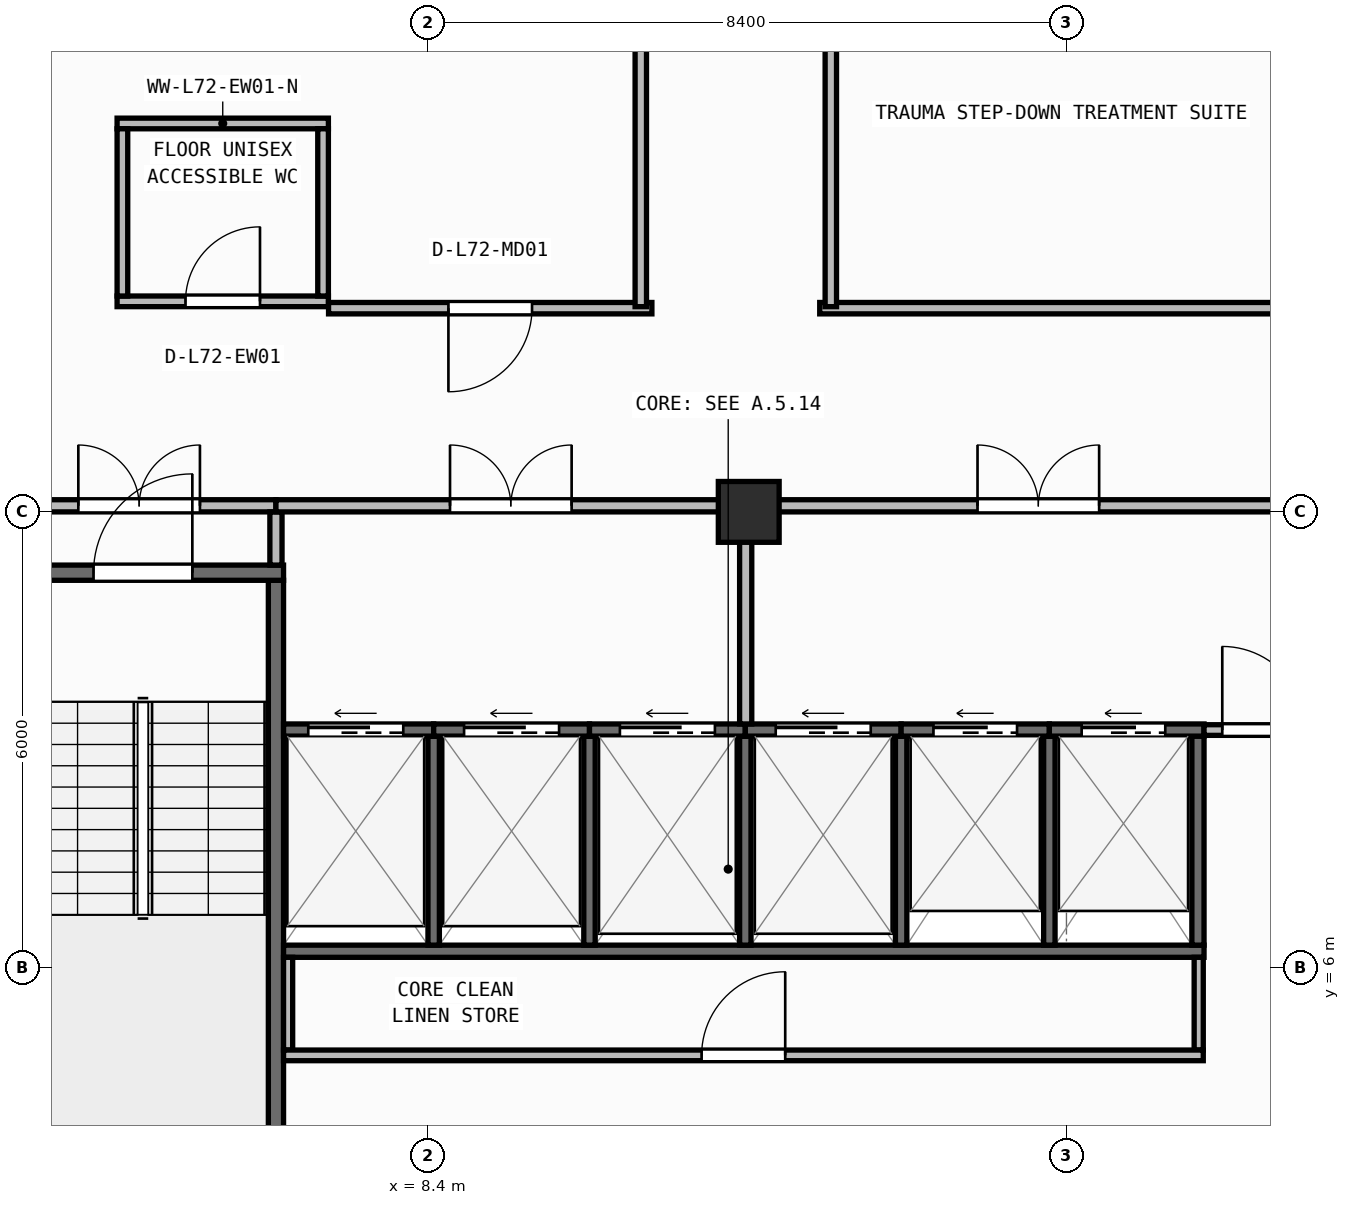
"""IFC4 building model, lengths in metres.
Left out: names, types, materials, properties, quantities, classifications, styles, units other than length and angle.
Written with IfcOpenShell. Run it as: python <this file> out.ifc"""

import sys

from ifc_helpers import new_model, si_unit, direction, frame, frame_2d, origin, origin_2d, place, context, subcontext, project, spatial, rectangle, extrude, element, fill, save


model = new_model("IFC4")
c1 = context("Model", 3, precision=1e-05, world=origin(), true_north=direction((0.0, 1.0)))
c2 = subcontext(c1, "Body", "Model", "MODEL_VIEW")
j1 = project(units=[si_unit("LENGTHUNIT", "METRE"), si_unit("PLANEANGLEUNIT", "RADIAN")], contexts=[c1])
p1 = place(None, origin())
s1 = spatial("IfcSite", under=j1, at=p1, CompositionType="ELEMENT")
p2 = place(p1, origin())
s2 = spatial("IfcBuilding", under=s1, at=p2, CompositionType="ELEMENT")
p3 = place(p2, frame((0.0, 0.0, 292.1)))
s3 = spatial("IfcBuildingStorey", under=s2, at=p3, CompositionType="ELEMENT", Elevation=292.1)
p4 = place(p3, frame((12.62, 12.0, 0.0), z_axis=(0.0, 0.0, 1.0), x_axis=(1.0, 0.0, 0.0)))
e1 = element("IfcColumn", 1, at=p4, inside=s3, PredefinedType="COLUMN", context=c2, shape_type="SweptSolid", body=[
    extrude(rectangle(XDim=0.8, YDim=0.8, at=origin_2d()), origin(), (0.0, 0.0, 1.0), 3.95),
])
p5 = place(p3, frame((6.4, 3.5, 0.0), z_axis=(0.0, 0.0, 1.0), x_axis=(0.0, 1.0, 0.0)))
e2 = element("IfcWall", 2, at=p5, inside=s3, PredefinedType="SHEAR", context=c2, shape_type="SweptSolid", body=[
    extrude(rectangle(XDim=7.6, YDim=0.2, at=frame_2d((3.8, 0.0))), origin(), (0.0, 0.0, 1.0), 3.71),
])
p6 = place(p3, frame((2.8, 11.2, 0.0), z_axis=(0.0, 0.0, 1.0), x_axis=(1.0, 0.0, 0.0)))
e3 = element("IfcWall", 3, at=p6, inside=s3, PredefinedType="SHEAR", context=c2, shape_type="SweptSolid", body=[
    extrude(rectangle(XDim=3.7, YDim=0.2, at=frame_2d((1.85, 0.0))), origin(), (0.0, 0.0, 1.0), 3.71),
])
p7 = place(p6, frame((1.2, 0.0, 0.0)))
e4 = element("IfcOpeningElement", 4, at=p7, cuts=e3, PredefinedType="OPENING", context=c2, shape_type="SweptSolid", body=[
    extrude(rectangle(XDim=1.3, YDim=2.15, at=frame_2d((0.65, 1.075))), frame((0.0, 0.11, 0.0), z_axis=(0.0, -1.0, 0.0), x_axis=(1.0, 0.0, 0.0)), (0.0, 0.0, 1.0), 0.22),
])
p8 = place(p3, frame((6.5, 6.22, 0.0), z_axis=(0.0, 0.0, 1.0), x_axis=(1.0, 0.0, 0.0)))
e5 = element("IfcWall", 5, at=p8, inside=s3, PredefinedType="SHEAR", context=c2, shape_type="SweptSolid", body=[
    extrude(rectangle(XDim=12.11, YDim=0.16, at=frame_2d((6.055, 0.0))), origin(), (0.0, 0.0, 1.0), 3.71),
])
p9 = place(p3, frame((18.53, 6.3, 0.0), z_axis=(0.0, 0.0, 1.0), x_axis=(0.0, 1.0, 0.0)))
e6 = element("IfcWall", 6, at=p9, inside=s3, PredefinedType="SHEAR", context=c2, shape_type="SweptSolid", body=[
    extrude(rectangle(XDim=2.75, YDim=0.16, at=frame_2d((1.375, 0.0))), origin(), (0.0, 0.0, 1.0), 3.71),
])
for number, where, z_axis, x_axis in (
    (7, (8.475, 6.3, 0.0), (0.0, 0.0, 1.0), (0.0, 1.0, 0.0)),
    (8, (10.525, 6.3, 0.0), (0.0, 0.0, 1.0), (0.0, 1.0, 0.0)),
    (9, (12.575, 6.3, 0.0), (0.0, 0.0, 1.0), (0.0, 1.0, 0.0)),
    (10, (14.625, 6.3, 0.0), (0.0, 0.0, 1.0), (0.0, 1.0, 0.0)),
    (11, (16.575, 6.3, 0.0), (0.0, 0.0, 1.0), (0.0, 1.0, 0.0)),
):
    element("IfcWall", number, at=place(p3, frame(where, z_axis=z_axis, x_axis=x_axis)), inside=s3, PredefinedType="SHEAR", context=c2, shape_type="SweptSolid", body=[
        extrude(rectangle(XDim=2.75, YDim=0.15, at=frame_2d((1.375, 0.0))), origin(), (0.0, 0.0, 1.0), 3.71),
    ])
p10 = place(p3, frame((6.5, 9.13, 0.0), z_axis=(0.0, 0.0, 1.0), x_axis=(1.0, 0.0, 0.0)))
e12 = element("IfcWall", 12, at=p10, inside=s3, PredefinedType="SHEAR", context=c2, shape_type="SweptSolid", body=[
    extrude(rectangle(XDim=1.975, YDim=0.16, at=frame_2d((0.988, 0.0))), origin(), (0.0, 0.0, 1.0), 3.71),
])
p11 = place(p10, frame((0.325, 0.0, 0.0)))
e13 = element("IfcOpeningElement", 13, at=p11, cuts=e12, PredefinedType="OPENING", context=c2, shape_type="SweptSolid", body=[
    extrude(rectangle(XDim=1.25, YDim=2.15, at=frame_2d((0.625, 1.075))), frame((0.0, 0.09, 0.0), z_axis=(0.0, -1.0, 0.0), x_axis=(1.0, 0.0, 0.0)), (0.0, 0.0, 1.0), 0.18),
])
p12 = place(p3, frame((8.475, 9.13, 0.0), z_axis=(0.0, 0.0, 1.0), x_axis=(1.0, 0.0, 0.0)))
e14 = element("IfcWall", 14, at=p12, inside=s3, PredefinedType="SHEAR", context=c2, shape_type="SweptSolid", body=[
    extrude(rectangle(XDim=2.05, YDim=0.16, at=frame_2d((1.025, 0.0))), origin(), (0.0, 0.0, 1.0), 3.71),
])
p13 = place(p12, frame((0.4, 0.0, 0.0)))
e15 = element("IfcOpeningElement", 15, at=p13, cuts=e14, PredefinedType="OPENING", context=c2, shape_type="SweptSolid", body=[
    extrude(rectangle(XDim=1.25, YDim=2.15, at=frame_2d((0.625, 1.075))), frame((0.0, 0.09, 0.0), z_axis=(0.0, -1.0, 0.0), x_axis=(1.0, 0.0, 0.0)), (0.0, 0.0, 1.0), 0.18),
])
p14 = place(p3, frame((10.525, 9.13, 0.0), z_axis=(0.0, 0.0, 1.0), x_axis=(1.0, 0.0, 0.0)))
e16 = element("IfcWall", 16, at=p14, inside=s3, PredefinedType="SHEAR", context=c2, shape_type="SweptSolid", body=[
    extrude(rectangle(XDim=2.05, YDim=0.16, at=frame_2d((1.025, 0.0))), origin(), (0.0, 0.0, 1.0), 3.71),
])
p15 = place(p14, frame((0.4, 0.0, 0.0)))
e17 = element("IfcOpeningElement", 17, at=p15, cuts=e16, PredefinedType="OPENING", context=c2, shape_type="SweptSolid", body=[
    extrude(rectangle(XDim=1.25, YDim=2.15, at=frame_2d((0.625, 1.075))), frame((0.0, 0.09, 0.0), z_axis=(0.0, -1.0, 0.0), x_axis=(1.0, 0.0, 0.0)), (0.0, 0.0, 1.0), 0.18),
])
p16 = place(p3, frame((12.575, 9.13, 0.0), z_axis=(0.0, 0.0, 1.0), x_axis=(1.0, 0.0, 0.0)))
e18 = element("IfcWall", 18, at=p16, inside=s3, PredefinedType="SHEAR", context=c2, shape_type="SweptSolid", body=[
    extrude(rectangle(XDim=2.05, YDim=0.16, at=frame_2d((1.025, 0.0))), origin(), (0.0, 0.0, 1.0), 3.71),
])
p17 = place(p16, frame((0.4, 0.0, 0.0)))
e19 = element("IfcOpeningElement", 19, at=p17, cuts=e18, PredefinedType="OPENING", context=c2, shape_type="SweptSolid", body=[
    extrude(rectangle(XDim=1.25, YDim=2.15, at=frame_2d((0.625, 1.075))), frame((0.0, 0.09, 0.0), z_axis=(0.0, -1.0, 0.0), x_axis=(1.0, 0.0, 0.0)), (0.0, 0.0, 1.0), 0.18),
])
p18 = place(p3, frame((14.625, 9.13, 0.0), z_axis=(0.0, 0.0, 1.0), x_axis=(1.0, 0.0, 0.0)))
e20 = element("IfcWall", 20, at=p18, inside=s3, PredefinedType="SHEAR", context=c2, shape_type="SweptSolid", body=[
    extrude(rectangle(XDim=1.95, YDim=0.16, at=frame_2d((0.975, 0.0))), origin(), (0.0, 0.0, 1.0), 3.71),
])
p19 = place(p18, frame((0.425, 0.0, 0.0)))
e21 = element("IfcOpeningElement", 21, at=p19, cuts=e20, PredefinedType="OPENING", context=c2, shape_type="SweptSolid", body=[
    extrude(rectangle(XDim=1.1, YDim=2.15, at=frame_2d((0.55, 1.075))), frame((0.0, 0.09, 0.0), z_axis=(0.0, -1.0, 0.0), x_axis=(1.0, 0.0, 0.0)), (0.0, 0.0, 1.0), 0.18),
])
p20 = place(p3, frame((16.575, 9.13, 0.0), z_axis=(0.0, 0.0, 1.0), x_axis=(1.0, 0.0, 0.0)))
e22 = element("IfcWall", 22, at=p20, inside=s3, PredefinedType="SHEAR", context=c2, shape_type="SweptSolid", body=[
    extrude(rectangle(XDim=2.035, YDim=0.16, at=frame_2d((1.018, 0.0))), origin(), (0.0, 0.0, 1.0), 3.71),
])
p21 = place(p20, frame((0.425, 0.0, 0.0)))
e23 = element("IfcOpeningElement", 23, at=p21, cuts=e22, PredefinedType="OPENING", context=c2, shape_type="SweptSolid", body=[
    extrude(rectangle(XDim=1.1, YDim=2.15, at=frame_2d((0.55, 1.075))), frame((0.0, 0.09, 0.0), z_axis=(0.0, -1.0, 0.0), x_axis=(1.0, 0.0, 0.0)), (0.0, 0.0, 1.0), 0.18),
])
for number, where, z_axis, x_axis in (
    (24, (6.56, 4.92, 0.0), (0.0, 0.0, 1.0), (0.0, 1.0, 0.0)),
    (25, (18.54, 4.92, 0.0), (0.0, 0.0, 1.0), (0.0, 1.0, 0.0)),
):
    element("IfcWall", number, at=place(p3, frame(where, z_axis=z_axis, x_axis=x_axis)), inside=s3, PredefinedType="PARTITIONING", context=c2, shape_type="SweptSolid", body=[
        extrude(rectangle(XDim=1.22, YDim=0.12, at=frame_2d((0.61, 0.0))), origin(), (0.0, 0.0, 1.0), 3.71),
    ])
p22 = place(p3, frame((6.5, 4.85, 0.0), z_axis=(0.0, 0.0, 1.0), x_axis=(1.0, 0.0, 0.0)))
e26 = element("IfcWall", 26, at=p22, inside=s3, PredefinedType="PARTITIONING", context=c2, shape_type="SweptSolid", body=[
    extrude(rectangle(XDim=12.1, YDim=0.14, at=frame_2d((6.05, 0.0))), origin(), (0.0, 0.0, 1.0), 3.71),
])
p23 = place(p22, frame((5.5, 0.0, 0.0)))
e27 = element("IfcOpeningElement", 27, at=p23, cuts=e26, PredefinedType="OPENING", context=c2, shape_type="SweptSolid", body=[
    extrude(rectangle(XDim=1.1, YDim=2.1, at=frame_2d((0.55, 1.05))), frame((0.0, 0.08, 0.0), z_axis=(0.0, -1.0, 0.0), x_axis=(1.0, 0.0, 0.0)), (0.0, 0.0, 1.0), 0.16),
])
p24 = place(p3, frame((18.61, 9.13, 0.0), z_axis=(0.0, 0.0, 1.0), x_axis=(1.0, 0.0, 0.0)))
e28 = element("IfcWall", 28, at=p24, inside=s3, PredefinedType="PARTITIONING", context=c2, shape_type="SweptSolid", body=[
    extrude(rectangle(XDim=1.59, YDim=0.14, at=frame_2d((0.795, 0.0))), origin(), (0.0, 0.0, 1.0), 3.71),
])
p25 = place(p24, frame((0.24, 0.0, 0.0)))
e29 = element("IfcOpeningElement", 29, at=p25, cuts=e28, PredefinedType="OPENING", context=c2, shape_type="SweptSolid", body=[
    extrude(rectangle(XDim=1.1, YDim=2.1, at=frame_2d((0.55, 1.05))), frame((0.0, 0.08, 0.0), z_axis=(0.0, -1.0, 0.0), x_axis=(1.0, 0.0, 0.0)), (0.0, 0.0, 1.0), 0.16),
])
p26 = place(p3, frame((2.8, 12.08, 0.0), z_axis=(0.0, 0.0, 1.0), x_axis=(1.0, 0.0, 0.0)))
e30 = element("IfcWall", 30, at=p26, inside=s3, PredefinedType="PARTITIONING", context=c2, shape_type="SweptSolid", body=[
    extrude(rectangle(XDim=3.6, YDim=0.16, at=frame_2d((1.8, 0.0))), origin(), (0.0, 0.0, 1.0), 3.157),
])
p27 = place(p26, frame((1.0, 0.0, 0.0)))
e31 = element("IfcOpeningElement", 31, at=p27, cuts=e30, PredefinedType="OPENING", context=c2, shape_type="SweptSolid", body=[
    extrude(rectangle(XDim=1.6, YDim=2.05, at=frame_2d((0.8, 1.025))), frame((0.0, 0.09, 0.0), z_axis=(0.0, -1.0, 0.0), x_axis=(1.0, 0.0, 0.0)), (0.0, 0.0, 1.0), 0.18),
])
p28 = place(p3, frame((6.4, 11.3, 0.0), z_axis=(0.0, 0.0, 1.0), x_axis=(0.0, 1.0, 0.0)))
e32 = element("IfcWall", 32, at=p28, inside=s3, PredefinedType="PARTITIONING", context=c2, shape_type="SweptSolid", body=[
    extrude(rectangle(XDim=0.7, YDim=0.16, at=frame_2d((0.35, 0.0))), origin(), (0.0, 0.0, 1.0), 3.71),
])
p29 = place(p3, frame((6.4, 12.08, 0.0), z_axis=(0.0, 0.0, 1.0), x_axis=(1.0, 0.0, 0.0)))
e33 = element("IfcWall", 33, at=p29, inside=s3, PredefinedType="PARTITIONING", context=c2, shape_type="SweptSolid", body=[
    extrude(rectangle(XDim=6.18, YDim=0.16, at=frame_2d((3.09, 0.0))), origin(), (0.0, 0.0, 1.0), 3.157),
])
p30 = place(p29, frame((2.29, 0.0, 0.0)))
e34 = element("IfcOpeningElement", 34, at=p30, cuts=e33, PredefinedType="OPENING", context=c2, shape_type="SweptSolid", body=[
    extrude(rectangle(XDim=1.6, YDim=2.05, at=frame_2d((0.8, 1.025))), frame((0.0, 0.09, 0.0), z_axis=(0.0, -1.0, 0.0), x_axis=(1.0, 0.0, 0.0)), (0.0, 0.0, 1.0), 0.18),
])
p31 = place(p3, frame((12.58, 9.21, 0.0), z_axis=(0.0, 0.0, 1.0), x_axis=(0.0, 1.0, 0.0)))
e35 = element("IfcWall", 35, at=p31, inside=s3, PredefinedType="PARTITIONING", context=c2, shape_type="SweptSolid", body=[
    extrude(rectangle(XDim=2.79, YDim=0.16, at=frame_2d((1.395, 0.0))), origin(), (0.0, 0.0, 1.0), 3.71),
])
p32 = place(p3, frame((12.58, 12.08, 0.0), z_axis=(0.0, 0.0, 1.0), x_axis=(1.0, 0.0, 0.0)))
e36 = element("IfcWall", 36, at=p32, inside=s3, PredefinedType="PARTITIONING", context=c2, shape_type="SweptSolid", body=[
    extrude(rectangle(XDim=7.7, YDim=0.16, at=frame_2d((3.85, 0.0))), origin(), (0.0, 0.0, 1.0), 3.157),
])
p33 = place(p32, frame((3.05, 0.0, 0.0)))
e37 = element("IfcOpeningElement", 37, at=p33, cuts=e36, PredefinedType="OPENING", context=c2, shape_type="SweptSolid", body=[
    extrude(rectangle(XDim=1.6, YDim=2.05, at=frame_2d((0.8, 1.025))), frame((0.0, 0.09, 0.0), z_axis=(0.0, -1.0, 0.0), x_axis=(1.0, 0.0, 0.0)), (0.0, 0.0, 1.0), 0.18),
])
p34 = place(p3, frame((4.31, 14.77, 0.0), z_axis=(0.0, 0.0, 1.0), x_axis=(1.0, 0.0, 0.0)))
e38 = element("IfcWall", 38, at=p34, inside=s3, PredefinedType="PARTITIONING", context=c2, shape_type="SweptSolid", body=[
    extrude(rectangle(XDim=2.78, YDim=0.14, at=frame_2d((1.39, 0.0))), origin(), (0.0, 0.0, 1.0), 3.71),
])
p35 = place(p34, frame((0.9, 0.0, 0.0)))
e39 = element("IfcOpeningElement", 39, at=p35, cuts=e38, PredefinedType="OPENING", context=c2, shape_type="SweptSolid", body=[
    extrude(rectangle(XDim=0.98, YDim=2.1, at=frame_2d((0.49, 1.05))), frame((0.0, 0.08, 0.0), z_axis=(0.0, -1.0, 0.0), x_axis=(1.0, 0.0, 0.0)), (0.0, 0.0, 1.0), 0.16),
])
p36 = place(p3, frame((4.31, 17.11, 0.0), z_axis=(0.0, 0.0, 1.0), x_axis=(1.0, 0.0, 0.0)))
e40 = element("IfcWall", 40, at=p36, inside=s3, PredefinedType="PARTITIONING", context=c2, shape_type="SweptSolid", body=[
    extrude(rectangle(XDim=2.78, YDim=0.14, at=frame_2d((1.39, 0.0))), origin(), (0.0, 0.0, 1.0), 3.71),
])
for number, where, z_axis, x_axis in (
    (41, (4.38, 14.84, 0.0), (0.0, 0.0, 1.0), (0.0, 1.0, 0.0)),
    (42, (7.02, 14.84, 0.0), (0.0, 0.0, 1.0), (0.0, 1.0, 0.0)),
):
    element("IfcWall", number, at=place(p3, frame(where, z_axis=z_axis, x_axis=x_axis)), inside=s3, PredefinedType="PARTITIONING", context=c2, shape_type="SweptSolid", body=[
        extrude(rectangle(XDim=2.2, YDim=0.14, at=frame_2d((1.1, 0.0))), origin(), (0.0, 0.0, 1.0), 3.71),
    ])
p37 = place(p3, frame((11.346, 14.68, 0.0), z_axis=(0.0, 0.0, 1.0), x_axis=(-1.0, 0.0, 0.0)))
e43 = element("IfcWall", 43, at=p37, inside=s3, PredefinedType="PARTITIONING", context=c2, shape_type="SweptSolid", body=[
    extrude(rectangle(XDim=4.254, YDim=0.15, at=frame_2d((2.127, 0.0))), origin(), (0.0, 0.0, 1.0), 3.71),
])
p38 = place(p37, frame((1.577, 0.0, 0.0)))
e44 = element("IfcOpeningElement", 44, at=p38, cuts=e43, PredefinedType="OPENING", context=c2, shape_type="SweptSolid", body=[
    extrude(rectangle(XDim=1.1, YDim=2.1, at=frame_2d((0.55, 1.05))), frame((0.0, 0.085, 0.0), z_axis=(0.0, -1.0, 0.0), x_axis=(1.0, 0.0, 0.0)), (0.0, 0.0, 1.0), 0.17),
])
p39 = place(p3, frame((28.716, 14.68, 0.0), z_axis=(0.0, 0.0, 1.0), x_axis=(-1.0, 0.0, 0.0)))
e45 = element("IfcWall", 45, at=p39, inside=s3, PredefinedType="PARTITIONING", context=c2, shape_type="SweptSolid", body=[
    extrude(rectangle(XDim=15.162, YDim=0.15, at=frame_2d((7.581, 0.0))), origin(), (0.0, 0.0, 1.0), 3.71),
])
p40 = place(p39, frame((7.031, 0.0, 0.0)))
e46 = element("IfcOpeningElement", 46, at=p40, cuts=e45, PredefinedType="OPENING", context=c2, shape_type="SweptSolid", body=[
    extrude(rectangle(XDim=1.1, YDim=2.1, at=frame_2d((0.55, 1.05))), frame((0.0, 0.085, 0.0), z_axis=(0.0, -1.0, 0.0), x_axis=(1.0, 0.0, 0.0)), (0.0, 0.0, 1.0), 0.17),
])
p41 = place(p3, frame((11.2, 26.6, 0.0), z_axis=(0.0, 0.0, 1.0), x_axis=(0.0, -1.0, 0.0)))
e47 = element("IfcWall", 47, at=p41, inside=s3, PredefinedType="PARTITIONING", context=c2, shape_type="SweptSolid", body=[
    extrude(rectangle(XDim=11.9, YDim=0.15, at=frame_2d((5.95, 0.0))), origin(), (0.0, 0.0, 1.0), 3.71),
])
p42 = place(p3, frame((13.7, 14.7, 0.0), z_axis=(0.0, 0.0, 1.0), x_axis=(0.0, 1.0, 0.0)))
e48 = element("IfcWall", 48, at=p42, inside=s3, PredefinedType="PARTITIONING", context=c2, shape_type="SweptSolid", body=[
    extrude(rectangle(XDim=5.326, YDim=0.15, at=frame_2d((2.663, 0.0))), origin(), (0.0, 0.0, 1.0), 3.71),
])
p43 = place(p7, origin())
e49 = element("IfcDoor", 49, at=p43, inside=s3, OperationType="SINGLE_SWING_RIGHT", PredefinedType="DOOR", context=c2, shape_type="SweptSolid", body=[
    extrude(rectangle(XDim=1.3, YDim=2.15, at=frame_2d((0.65, 1.075))), frame((0.0, 0.025, 0.0), z_axis=(0.0, -1.0, 0.0), x_axis=(1.0, 0.0, 0.0)), (0.0, 0.0, 1.0), 0.05),
])
fill(e4, e49)
p44 = place(p11, origin())
e50 = element("IfcDoor", 50, at=p44, inside=s3, OperationType="SLIDING_TO_LEFT", PredefinedType="DOOR", context=c2, shape_type="SweptSolid", body=[
    extrude(rectangle(XDim=1.25, YDim=2.15, at=frame_2d((0.625, 1.075))), frame((0.0, 0.025, 0.0), z_axis=(0.0, -1.0, 0.0), x_axis=(1.0, 0.0, 0.0)), (0.0, 0.0, 1.0), 0.05),
])
fill(e13, e50)
p45 = place(p13, origin())
e51 = element("IfcDoor", 51, at=p45, inside=s3, OperationType="SLIDING_TO_LEFT", PredefinedType="DOOR", context=c2, shape_type="SweptSolid", body=[
    extrude(rectangle(XDim=1.25, YDim=2.15, at=frame_2d((0.625, 1.075))), frame((0.0, 0.025, 0.0), z_axis=(0.0, -1.0, 0.0), x_axis=(1.0, 0.0, 0.0)), (0.0, 0.0, 1.0), 0.05),
])
fill(e15, e51)
p46 = place(p15, origin())
e52 = element("IfcDoor", 52, at=p46, inside=s3, OperationType="SLIDING_TO_LEFT", PredefinedType="DOOR", context=c2, shape_type="SweptSolid", body=[
    extrude(rectangle(XDim=1.25, YDim=2.15, at=frame_2d((0.625, 1.075))), frame((0.0, 0.025, 0.0), z_axis=(0.0, -1.0, 0.0), x_axis=(1.0, 0.0, 0.0)), (0.0, 0.0, 1.0), 0.05),
])
fill(e17, e52)
p47 = place(p17, origin())
e53 = element("IfcDoor", 53, at=p47, inside=s3, OperationType="SLIDING_TO_LEFT", PredefinedType="DOOR", context=c2, shape_type="SweptSolid", body=[
    extrude(rectangle(XDim=1.25, YDim=2.15, at=frame_2d((0.625, 1.075))), frame((0.0, 0.025, 0.0), z_axis=(0.0, -1.0, 0.0), x_axis=(1.0, 0.0, 0.0)), (0.0, 0.0, 1.0), 0.05),
])
fill(e19, e53)
p48 = place(p19, origin())
e54 = element("IfcDoor", 54, at=p48, inside=s3, OperationType="SLIDING_TO_LEFT", PredefinedType="DOOR", context=c2, shape_type="SweptSolid", body=[
    extrude(rectangle(XDim=1.1, YDim=2.15, at=frame_2d((0.55, 1.075))), frame((0.0, 0.025, 0.0), z_axis=(0.0, -1.0, 0.0), x_axis=(1.0, 0.0, 0.0)), (0.0, 0.0, 1.0), 0.05),
])
fill(e21, e54)
p49 = place(p21, origin())
e55 = element("IfcDoor", 55, at=p49, inside=s3, OperationType="SLIDING_TO_LEFT", PredefinedType="DOOR", context=c2, shape_type="SweptSolid", body=[
    extrude(rectangle(XDim=1.1, YDim=2.15, at=frame_2d((0.55, 1.075))), frame((0.0, 0.025, 0.0), z_axis=(0.0, -1.0, 0.0), x_axis=(1.0, 0.0, 0.0)), (0.0, 0.0, 1.0), 0.05),
])
fill(e23, e55)
p50 = place(p23, origin())
e56 = element("IfcDoor", 56, at=p50, inside=s3, OperationType="SINGLE_SWING_RIGHT", PredefinedType="DOOR", context=c2, shape_type="SweptSolid", body=[
    extrude(rectangle(XDim=1.1, YDim=2.1, at=frame_2d((0.55, 1.05))), frame((0.0, 0.025, 0.0), z_axis=(0.0, -1.0, 0.0), x_axis=(1.0, 0.0, 0.0)), (0.0, 0.0, 1.0), 0.05),
])
fill(e27, e56)
p51 = place(p25, origin())
e57 = element("IfcDoor", 57, at=p51, inside=s3, OperationType="SINGLE_SWING_LEFT", PredefinedType="DOOR", context=c2, shape_type="SweptSolid", body=[
    extrude(rectangle(XDim=1.1, YDim=2.1, at=frame_2d((0.55, 1.05))), frame((0.0, 0.025, 0.0), z_axis=(0.0, -1.0, 0.0), x_axis=(1.0, 0.0, 0.0)), (0.0, 0.0, 1.0), 0.05),
])
fill(e29, e57)
p52 = place(p27, origin())
e58 = element("IfcDoor", 58, at=p52, inside=s3, OperationType="DOUBLE_DOOR_SINGLE_SWING", PredefinedType="DOOR", context=c2, shape_type="SweptSolid", body=[
    extrude(rectangle(XDim=1.6, YDim=2.05, at=frame_2d((0.8, 1.025))), frame((0.0, 0.025, 0.0), z_axis=(0.0, -1.0, 0.0), x_axis=(1.0, 0.0, 0.0)), (0.0, 0.0, 1.0), 0.05),
])
fill(e31, e58)
p53 = place(p30, origin())
e59 = element("IfcDoor", 59, at=p53, inside=s3, OperationType="DOUBLE_DOOR_SINGLE_SWING", PredefinedType="DOOR", context=c2, shape_type="SweptSolid", body=[
    extrude(rectangle(XDim=1.6, YDim=2.05, at=frame_2d((0.8, 1.025))), frame((0.0, 0.025, 0.0), z_axis=(0.0, -1.0, 0.0), x_axis=(1.0, 0.0, 0.0)), (0.0, 0.0, 1.0), 0.05),
])
fill(e34, e59)
p54 = place(p33, origin())
e60 = element("IfcDoor", 60, at=p54, inside=s3, OperationType="DOUBLE_DOOR_SINGLE_SWING", PredefinedType="DOOR", context=c2, shape_type="SweptSolid", body=[
    extrude(rectangle(XDim=1.6, YDim=2.05, at=frame_2d((0.8, 1.025))), frame((0.0, 0.025, 0.0), z_axis=(0.0, -1.0, 0.0), x_axis=(1.0, 0.0, 0.0)), (0.0, 0.0, 1.0), 0.05),
])
fill(e37, e60)
p55 = place(p35, origin())
e61 = element("IfcDoor", 61, at=p55, inside=s3, OperationType="SINGLE_SWING_RIGHT", PredefinedType="DOOR", context=c2, shape_type="SweptSolid", body=[
    extrude(rectangle(XDim=0.98, YDim=2.1, at=frame_2d((0.49, 1.05))), frame((0.0, 0.025, 0.0), z_axis=(0.0, -1.0, 0.0), x_axis=(1.0, 0.0, 0.0)), (0.0, 0.0, 1.0), 0.05),
])
fill(e39, e61)
p56 = place(p38, origin())
e62 = element("IfcDoor", 62, at=p56, inside=s3, OperationType="SINGLE_SWING_RIGHT", PredefinedType="DOOR", context=c2, shape_type="SweptSolid", body=[
    extrude(rectangle(XDim=1.1, YDim=2.1, at=frame_2d((0.55, 1.05))), frame((0.0, 0.025, 0.0), z_axis=(0.0, -1.0, 0.0), x_axis=(1.0, 0.0, 0.0)), (0.0, 0.0, 1.0), 0.05),
])
fill(e44, e62)
save(model, sys.argv[1])
